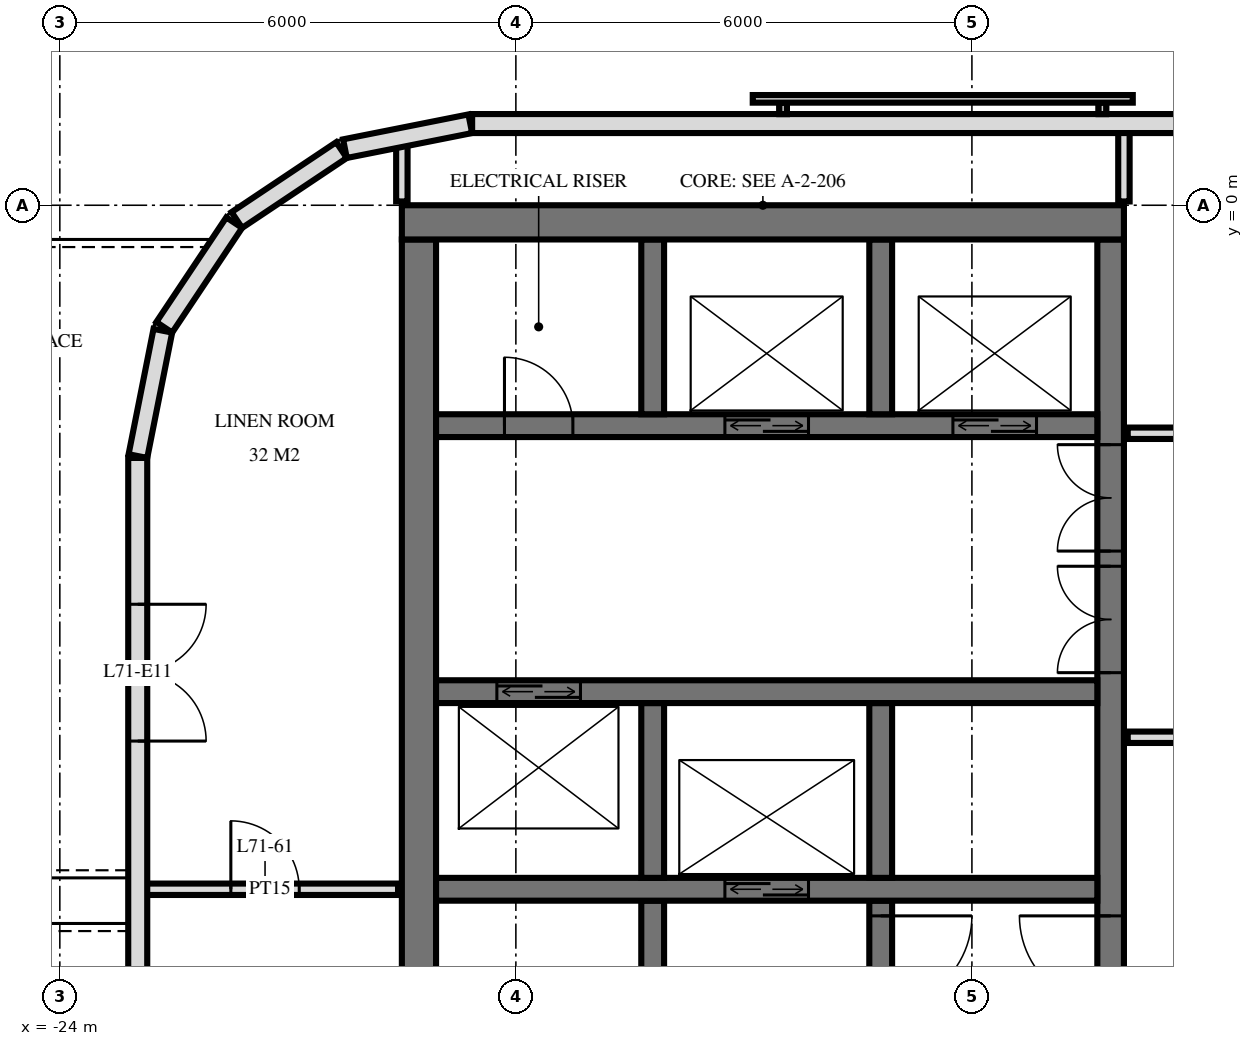
"""IFC4 building model, lengths in metres.
Left out: names, types, materials, properties, quantities, classifications, styles, units other than length and angle.
Written with IfcOpenShell. Run it as: python <this file> out.ifc"""

import sys

from ifc_helpers import new_model, si_unit, direction, frame, frame_2d, origin, place, context, subcontext, project, spatial, rectangle, extrude, element, fill, save


model = new_model("IFC4")
c1 = context("Model", 3, precision=1e-05, world=origin(), true_north=direction((0.0, 1.0)))
c2 = subcontext(c1, "Body", "Model", "MODEL_VIEW")
j1 = project(units=[si_unit("LENGTHUNIT", "METRE"), si_unit("PLANEANGLEUNIT", "RADIAN")], contexts=[c1])
p1 = place(None, origin())
s1 = spatial("IfcSite", under=j1, at=p1, CompositionType="ELEMENT")
p2 = place(p1, origin())
s2 = spatial("IfcBuilding", under=s1, at=p2, CompositionType="ELEMENT")
p3 = place(p2, frame((0.0, 0.0, 270.1)))
s3 = spatial("IfcBuildingStorey", under=s2, at=p3, CompositionType="ELEMENT", Elevation=270.1)
p4 = place(p3, frame((-19.5, -0.225, 0.0), z_axis=(0.0, 0.0, 1.0), x_axis=(1.0, 0.0, 0.0)))
e1 = element("IfcWall", 1, at=p4, inside=s3, PredefinedType="SHEAR", context=c2, shape_type="SweptSolid", body=[
    extrude(rectangle(XDim=9.5, YDim=0.45, at=frame_2d((4.75, 0.0))), origin(), (0.0, 0.0, 1.0), 3.5),
])
p5 = place(p3, frame((-10.175, -14.55, 0.0), z_axis=(0.0, 0.0, 1.0), x_axis=(0.0, 1.0, 0.0)))
e2 = element("IfcWall", 2, at=p5, inside=s3, PredefinedType="SHEAR", context=c2, shape_type="SweptSolid", body=[
    extrude(rectangle(XDim=14.1, YDim=0.35, at=frame_2d((7.05, 0.0))), origin(), (0.0, 0.0, 1.0), 3.5),
])
p6 = place(p5, frame((8.4, 0.0, 0.0)))
e3 = element("IfcOpeningElement", 3, at=p6, cuts=e2, PredefinedType="OPENING", context=c2, shape_type="SweptSolid", body=[
    extrude(rectangle(XDim=1.4, YDim=2.4, at=frame_2d((0.7, 1.2))), frame((0.0, 0.185, 0.0), z_axis=(0.0, -1.0, 0.0), x_axis=(1.0, 0.0, 0.0)), (0.0, 0.0, 1.0), 0.37),
])
p7 = place(p5, frame((10.0, 0.0, 0.0)))
e4 = element("IfcOpeningElement", 4, at=p7, cuts=e2, PredefinedType="OPENING", context=c2, shape_type="SweptSolid", body=[
    extrude(rectangle(XDim=1.4, YDim=2.4, at=frame_2d((0.7, 1.2))), frame((0.0, 0.185, 0.0), z_axis=(0.0, -1.0, 0.0), x_axis=(1.0, 0.0, 0.0)), (0.0, 0.0, 1.0), 0.37),
])
p8 = place(p5, frame((4.0, 0.0, 0.0)))
e5 = element("IfcOpeningElement", 5, at=p8, cuts=e2, PredefinedType="OPENING", context=c2, shape_type="SweptSolid", body=[
    extrude(rectangle(XDim=1.2, YDim=2.1, at=frame_2d((0.6, 1.05))), frame((0.0, 0.185, 0.0), z_axis=(0.0, -1.0, 0.0), x_axis=(1.0, 0.0, 0.0)), (0.0, 0.0, 1.0), 0.37),
])
p9 = place(p3, frame((-19.275, -14.55, 0.0), z_axis=(0.0, 0.0, 1.0), x_axis=(0.0, 1.0, 0.0)))
e6 = element("IfcWall", 6, at=p9, inside=s3, PredefinedType="SHEAR", context=c2, shape_type="SweptSolid", body=[
    extrude(rectangle(XDim=14.1, YDim=0.45, at=frame_2d((7.05, 0.0))), origin(), (0.0, 0.0, 1.0), 3.5),
])
p10 = place(p3, frame((-19.05, -2.9, 0.0), z_axis=(0.0, 0.0, 1.0), x_axis=(1.0, 0.0, 0.0)))
e7 = element("IfcWall", 7, at=p10, inside=s3, PredefinedType="SHEAR", context=c2, shape_type="SweptSolid", body=[
    extrude(rectangle(XDim=8.7, YDim=0.3, at=frame_2d((4.35, 0.0))), origin(), (0.0, 0.0, 1.0), 3.5),
])
p11 = place(p10, frame((6.8, 0.0, 0.0)))
e8 = element("IfcOpeningElement", 8, at=p11, cuts=e7, PredefinedType="OPENING", context=c2, shape_type="SweptSolid", body=[
    extrude(rectangle(XDim=1.1, YDim=2.1, at=frame_2d((0.55, 1.05))), frame((0.0, 0.16, 0.0), z_axis=(0.0, -1.0, 0.0), x_axis=(1.0, 0.0, 0.0)), (0.0, 0.0, 1.0), 0.32),
])
p12 = place(p10, frame((3.8, 0.0, 0.0)))
e9 = element("IfcOpeningElement", 9, at=p12, cuts=e7, PredefinedType="OPENING", context=c2, shape_type="SweptSolid", body=[
    extrude(rectangle(XDim=1.1, YDim=2.1, at=frame_2d((0.55, 1.05))), frame((0.0, 0.16, 0.0), z_axis=(0.0, -1.0, 0.0), x_axis=(1.0, 0.0, 0.0)), (0.0, 0.0, 1.0), 0.32),
])
p13 = place(p10, frame((0.9, 0.0, 0.0)))
e10 = element("IfcOpeningElement", 10, at=p13, cuts=e7, PredefinedType="OPENING", context=c2, shape_type="SweptSolid", body=[
    extrude(rectangle(XDim=0.9, YDim=2.1, at=frame_2d((0.45, 1.05))), frame((0.0, 0.16, 0.0), z_axis=(0.0, -1.0, 0.0), x_axis=(1.0, 0.0, 0.0)), (0.0, 0.0, 1.0), 0.32),
])
p14 = place(p3, frame((-19.05, -6.4, 0.0), z_axis=(0.0, 0.0, 1.0), x_axis=(1.0, 0.0, 0.0)))
e11 = element("IfcWall", 11, at=p14, inside=s3, PredefinedType="SHEAR", context=c2, shape_type="SweptSolid", body=[
    extrude(rectangle(XDim=8.7, YDim=0.3, at=frame_2d((4.35, 0.0))), origin(), (0.0, 0.0, 1.0), 3.5),
])
p15 = place(p14, frame((0.8, 0.0, 0.0)))
e12 = element("IfcOpeningElement", 12, at=p15, cuts=e11, PredefinedType="OPENING", context=c2, shape_type="SweptSolid", body=[
    extrude(rectangle(XDim=1.1, YDim=2.1, at=frame_2d((0.55, 1.05))), frame((0.0, 0.16, 0.0), z_axis=(0.0, -1.0, 0.0), x_axis=(1.0, 0.0, 0.0)), (0.0, 0.0, 1.0), 0.32),
])
p16 = place(p3, frame((-19.05, -9.0, 0.0), z_axis=(0.0, 0.0, 1.0), x_axis=(1.0, 0.0, 0.0)))
e13 = element("IfcWall", 13, at=p16, inside=s3, PredefinedType="SHEAR", context=c2, shape_type="SweptSolid", body=[
    extrude(rectangle(XDim=8.7, YDim=0.3, at=frame_2d((4.35, 0.0))), origin(), (0.0, 0.0, 1.0), 3.5),
])
p17 = place(p16, frame((3.8, 0.0, 0.0)))
e14 = element("IfcOpeningElement", 14, at=p17, cuts=e13, PredefinedType="OPENING", context=c2, shape_type="SweptSolid", body=[
    extrude(rectangle(XDim=1.1, YDim=2.1, at=frame_2d((0.55, 1.05))), frame((0.0, 0.16, 0.0), z_axis=(0.0, -1.0, 0.0), x_axis=(1.0, 0.0, 0.0)), (0.0, 0.0, 1.0), 0.32),
])
for number, where, z_axis, x_axis in (
    (15, (-13.2, -2.75, 0.0), (0.0, 0.0, 1.0), (0.0, 1.0, 0.0)),
    (16, (-13.2, -8.85, 0.0), (0.0, 0.0, 1.0), (0.0, 1.0, 0.0)),
):
    element("IfcWall", number, at=place(p3, frame(where, z_axis=z_axis, x_axis=x_axis)), inside=s3, PredefinedType="SHEAR", context=c2, shape_type="SweptSolid", body=[
        extrude(rectangle(XDim=2.3, YDim=0.3, at=frame_2d((1.15, 0.0))), origin(), (0.0, 0.0, 1.0), 3.5),
    ])
p18 = place(p3, frame((-13.2, -14.55, 0.0), z_axis=(0.0, 0.0, 1.0), x_axis=(0.0, 1.0, 0.0)))
e17 = element("IfcWall", 17, at=p18, inside=s3, PredefinedType="SHEAR", context=c2, shape_type="SweptSolid", body=[
    extrude(rectangle(XDim=5.4, YDim=0.3, at=frame_2d((2.7, 0.0))), origin(), (0.0, 0.0, 1.0), 3.5),
])
p19 = place(p18, frame((4.0, 0.0, 0.0)))
e18 = element("IfcOpeningElement", 18, at=p19, cuts=e17, PredefinedType="OPENING", context=c2, shape_type="SweptSolid", body=[
    extrude(rectangle(XDim=1.2, YDim=2.1, at=frame_2d((0.6, 1.05))), frame((0.0, 0.16, 0.0), z_axis=(0.0, -1.0, 0.0), x_axis=(1.0, 0.0, 0.0)), (0.0, 0.0, 1.0), 0.32),
])
for number, where, z_axis, x_axis in (
    (19, (-16.2, -2.75, 0.0), (0.0, 0.0, 1.0), (0.0, 1.0, 0.0)),
    (20, (-16.2, -8.85, 0.0), (0.0, 0.0, 1.0), (0.0, 1.0, 0.0)),
):
    element("IfcWall", number, at=place(p3, frame(where, z_axis=z_axis, x_axis=x_axis)), inside=s3, PredefinedType="SHEAR", context=c2, shape_type="SweptSolid", body=[
        extrude(rectangle(XDim=2.3, YDim=0.3, at=frame_2d((1.15, 0.0))), origin(), (0.0, 0.0, 1.0), 3.5),
    ])
p20 = place(p3, frame((-16.2, -14.55, 0.0), z_axis=(0.0, 0.0, 1.0), x_axis=(0.0, 1.0, 0.0)))
e21 = element("IfcWall", 21, at=p20, inside=s3, PredefinedType="SHEAR", context=c2, shape_type="SweptSolid", body=[
    extrude(rectangle(XDim=5.4, YDim=0.3, at=frame_2d((2.7, 0.0))), origin(), (0.0, 0.0, 1.0), 3.5),
])
p21 = place(p20, frame((0.2, 0.0, 0.0)))
e22 = element("IfcOpeningElement", 22, at=p21, cuts=e21, PredefinedType="OPENING", context=c2, shape_type="SweptSolid", body=[
    extrude(rectangle(XDim=1.2, YDim=2.1, at=frame_2d((0.6, 1.05))), frame((0.0, 0.16, 0.0), z_axis=(0.0, -1.0, 0.0), x_axis=(1.0, 0.0, 0.0)), (0.0, 0.0, 1.0), 0.32),
])
p22 = place(p3, frame((18.575, 1.075, 0.0), z_axis=(0.0, 0.0, 1.0), x_axis=(-1.0, 0.0, 0.0)))
e23 = element("IfcWall", 23, at=p22, inside=s3, PredefinedType="SOLIDWALL", context=c2, shape_type="SweptSolid", body=[
    extrude(rectangle(XDim=37.151, YDim=0.25, at=frame_2d((18.575, 0.0))), origin(), (0.0, 0.0, 1.0), 3.22),
])
p23 = place(p22, frame((9.275, 0.0, 0.9)))
e24 = element("IfcOpeningElement", 24, at=p23, cuts=e23, PredefinedType="OPENING", context=c2, shape_type="SweptSolid", body=[
    extrude(rectangle(XDim=2.4, YDim=1.5, at=frame_2d((1.2, 0.75))), frame((0.0, 0.135, 0.0), z_axis=(0.0, -1.0, 0.0), x_axis=(1.0, 0.0, 0.0)), (0.0, 0.0, 1.0), 0.27),
])
p24 = place(p22, frame((15.275, 0.0, 0.9)))
e25 = element("IfcOpeningElement", 25, at=p24, cuts=e23, PredefinedType="OPENING", context=c2, shape_type="SweptSolid", body=[
    extrude(rectangle(XDim=2.4, YDim=1.5, at=frame_2d((1.2, 0.75))), frame((0.0, 0.135, 0.0), z_axis=(0.0, -1.0, 0.0), x_axis=(1.0, 0.0, 0.0)), (0.0, 0.0, 1.0), 0.27),
])
p25 = place(p22, frame((25.125, 0.0, 0.9)))
e26 = element("IfcOpeningElement", 26, at=p25, cuts=e23, PredefinedType="OPENING", context=c2, shape_type="SweptSolid", body=[
    extrude(rectangle(XDim=2.4, YDim=1.5, at=frame_2d((1.2, 0.75))), frame((0.0, 0.135, 0.0), z_axis=(0.0, -1.0, 0.0), x_axis=(1.0, 0.0, 0.0)), (0.0, 0.0, 1.0), 0.27),
])
p26 = place(p3, frame((-18.6, 1.073, 0.0), z_axis=(0.0, 0.0, 1.0), x_axis=(-0.980797896849, -0.195026884138, 0.0)))
e27 = element("IfcWall", 27, at=p26, inside=s3, PredefinedType="SOLIDWALL", context=c2, shape_type="SweptSolid", body=[
    extrude(rectangle(XDim=1.681, YDim=0.25, at=frame_2d((0.841, 0.0))), origin(), (0.0, 0.0, 1.0), 3.22),
])
for number, where, z_axis, x_axis in (
    (28, (-20.294, 0.726, 0.0), (0.0, 0.0, 1.0), (-0.831, -0.556, 0.0)),
    (29, (-21.706, -0.229, 0.0), (0.0, 0.0, 1.0), (-0.556, -0.831, 0.0)),
):
    element("IfcWall", number, at=place(p3, frame(where, z_axis=z_axis, x_axis=x_axis)), inside=s3, PredefinedType="SOLIDWALL", context=c2, shape_type="SweptSolid", body=[
        extrude(rectangle(XDim=1.656, YDim=0.25, at=frame_2d((0.828, 0.0))), origin(), (0.0, 0.0, 1.0), 3.22),
    ])
p27 = place(p3, frame((-22.645, -1.651, 0.0), z_axis=(0.0, 0.0, 1.0), x_axis=(-0.19513878023, -0.980775640221, 0.0)))
e30 = element("IfcWall", 30, at=p27, inside=s3, PredefinedType="SOLIDWALL", context=c2, shape_type="SweptSolid", body=[
    extrude(rectangle(XDim=1.681, YDim=0.25, at=frame_2d((0.841, 0.0))), origin(), (0.0, 0.0, 1.0), 3.22),
])
p28 = place(p3, frame((-22.975, -3.325, 0.0), z_axis=(0.0, 0.0, 1.0), x_axis=(0.0, -1.0, 0.0)))
e31 = element("IfcWall", 31, at=p28, inside=s3, PredefinedType="SOLIDWALL", context=c2, shape_type="SweptSolid", body=[
    extrude(rectangle(XDim=25.951, YDim=0.25, at=frame_2d((12.975, 0.0))), origin(), (0.0, 0.0, 1.0), 3.22),
])
p29 = place(p28, frame((1.925, 0.0, 0.0)))
e32 = element("IfcOpeningElement", 32, at=p29, cuts=e31, PredefinedType="OPENING", context=c2, shape_type="SweptSolid", body=[
    extrude(rectangle(XDim=1.8, YDim=2.4, at=frame_2d((0.9, 1.2))), frame((0.0, 0.135, 0.0), z_axis=(0.0, -1.0, 0.0), x_axis=(1.0, 0.0, 0.0)), (0.0, 0.0, 1.0), 0.27),
])
p30 = place(p28, frame((7.975, 0.0, 0.0)))
e33 = element("IfcOpeningElement", 33, at=p30, cuts=e31, PredefinedType="OPENING", context=c2, shape_type="SweptSolid", body=[
    extrude(rectangle(XDim=1.8, YDim=2.4, at=frame_2d((0.9, 1.2))), frame((0.0, 0.135, 0.0), z_axis=(0.0, -1.0, 0.0), x_axis=(1.0, 0.0, 0.0)), (0.0, 0.0, 1.0), 0.27),
])
p31 = place(p28, frame((12.575, 0.0, 0.9)))
e34 = element("IfcOpeningElement", 34, at=p31, cuts=e31, PredefinedType="OPENING", context=c2, shape_type="SweptSolid", body=[
    extrude(rectangle(XDim=1.2, YDim=1.5, at=frame_2d((0.6, 0.75))), frame((0.0, 0.135, 0.0), z_axis=(0.0, -1.0, 0.0), x_axis=(1.0, 0.0, 0.0)), (0.0, 0.0, 1.0), 0.27),
])
p32 = place(p28, frame((15.775, 0.0, 0.0)))
e35 = element("IfcOpeningElement", 35, at=p32, cuts=e31, PredefinedType="OPENING", context=c2, shape_type="SweptSolid", body=[
    extrude(rectangle(XDim=1.8, YDim=2.4, at=frame_2d((0.9, 1.2))), frame((0.0, 0.135, 0.0), z_axis=(0.0, -1.0, 0.0), x_axis=(1.0, 0.0, 0.0)), (0.0, 0.0, 1.0), 0.27),
])
p33 = place(p28, frame((21.075, 0.0, 0.0)))
e36 = element("IfcOpeningElement", 36, at=p33, cuts=e31, PredefinedType="OPENING", context=c2, shape_type="SweptSolid", body=[
    extrude(rectangle(XDim=1.8, YDim=2.4, at=frame_2d((0.9, 1.2))), frame((0.0, 0.135, 0.0), z_axis=(0.0, -1.0, 0.0), x_axis=(1.0, 0.0, 0.0)), (0.0, 0.0, 1.0), 0.27),
])
p34 = place(p28, frame((23.825, 0.0, 0.9)))
e37 = element("IfcOpeningElement", 37, at=p34, cuts=e31, PredefinedType="OPENING", context=c2, shape_type="SweptSolid", body=[
    extrude(rectangle(XDim=1.8, YDim=1.5, at=frame_2d((0.9, 0.75))), frame((0.0, 0.135, 0.0), z_axis=(0.0, -1.0, 0.0), x_axis=(1.0, 0.0, 0.0)), (0.0, 0.0, 1.0), 0.27),
])
p35 = place(p3, frame((-10.0, 0.05, 0.0), z_axis=(0.0, 0.0, 1.0), x_axis=(0.0, 1.0, 0.0)))
e38 = element("IfcWall", 38, at=p35, inside=s3, PredefinedType="PARTITIONING", context=c2, shape_type="SweptSolid", body=[
    extrude(rectangle(XDim=0.97, YDim=0.15, at=frame_2d((0.485, 0.0))), origin(), (0.0, 0.0, 1.0), 3.22),
])
p36 = place(p3, frame((-19.5, 0.05, 0.0), z_axis=(0.0, 0.0, 1.0), x_axis=(0.0, 1.0, 0.0)))
e39 = element("IfcWall", 39, at=p36, inside=s3, PredefinedType="PARTITIONING", context=c2, shape_type="SweptSolid", body=[
    extrude(rectangle(XDim=0.787, YDim=0.15, at=frame_2d((0.394, 0.0))), origin(), (0.0, 0.0, 1.0), 3.22),
])
p37 = place(p3, frame((-22.92, -9.0, 0.0), z_axis=(0.0, 0.0, 1.0), x_axis=(1.0, 0.0, 0.0)))
e40 = element("IfcWall", 40, at=p37, inside=s3, PredefinedType="PARTITIONING", context=c2, shape_type="SweptSolid", body=[
    extrude(rectangle(XDim=3.37, YDim=0.15, at=frame_2d((1.685, 0.0))), origin(), (0.0, 0.0, 1.0), 3.22),
])
p38 = place(p37, frame((1.17, 0.0, 0.0)))
e41 = element("IfcOpeningElement", 41, at=p38, cuts=e40, PredefinedType="OPENING", context=c2, shape_type="SweptSolid", body=[
    extrude(rectangle(XDim=0.9, YDim=2.1, at=frame_2d((0.45, 1.05))), frame((0.0, 0.085, 0.0), z_axis=(0.0, -1.0, 0.0), x_axis=(1.0, 0.0, 0.0)), (0.0, 0.0, 1.0), 0.17),
])
p39 = place(p3, frame((-9.95, -7.0, 0.0), z_axis=(0.0, 0.0, 1.0), x_axis=(1.0, 0.0, 0.0)))
e42 = element("IfcWall", 42, at=p39, inside=s3, PredefinedType="PARTITIONING", context=c2, shape_type="SweptSolid", body=[
    extrude(rectangle(XDim=19.9, YDim=0.15, at=frame_2d((9.95, 0.0))), origin(), (0.0, 0.0, 1.0), 3.22),
])
p40 = place(p39, frame((9.45, 0.0, 0.0)))
e43 = element("IfcOpeningElement", 43, at=p40, cuts=e42, PredefinedType="OPENING", context=c2, shape_type="SweptSolid", body=[
    extrude(rectangle(XDim=1.0, YDim=2.1, at=frame_2d((0.5, 1.05))), frame((0.0, 0.085, 0.0), z_axis=(0.0, -1.0, 0.0), x_axis=(1.0, 0.0, 0.0)), (0.0, 0.0, 1.0), 0.17),
])
p41 = place(p39, frame((15.45, 0.0, 0.0)))
e44 = element("IfcOpeningElement", 44, at=p41, cuts=e42, PredefinedType="OPENING", context=c2, shape_type="SweptSolid", body=[
    extrude(rectangle(XDim=1.0, YDim=2.1, at=frame_2d((0.5, 1.05))), frame((0.0, 0.085, 0.0), z_axis=(0.0, -1.0, 0.0), x_axis=(1.0, 0.0, 0.0)), (0.0, 0.0, 1.0), 0.17),
])
p42 = place(p3, frame((-9.95, -3.0, 0.0), z_axis=(0.0, 0.0, 1.0), x_axis=(1.0, 0.0, 0.0)))
e45 = element("IfcWall", 45, at=p42, inside=s3, PredefinedType="PARTITIONING", context=c2, shape_type="SweptSolid", body=[
    extrude(rectangle(XDim=19.9, YDim=0.15, at=frame_2d((9.95, 0.0))), origin(), (0.0, 0.0, 1.0), 3.22),
])
p43 = place(p42, frame((1.7, 0.0, 0.0)))
e46 = element("IfcOpeningElement", 46, at=p43, cuts=e45, PredefinedType="OPENING", context=c2, shape_type="SweptSolid", body=[
    extrude(rectangle(XDim=1.0, YDim=2.1, at=frame_2d((0.5, 1.05))), frame((0.0, 0.085, 0.0), z_axis=(0.0, -1.0, 0.0), x_axis=(1.0, 0.0, 0.0)), (0.0, 0.0, 1.0), 0.17),
])
p44 = place(p42, frame((5.45, 0.0, 0.0)))
e47 = element("IfcOpeningElement", 47, at=p44, cuts=e45, PredefinedType="OPENING", context=c2, shape_type="SweptSolid", body=[
    extrude(rectangle(XDim=1.0, YDim=2.1, at=frame_2d((0.5, 1.05))), frame((0.0, 0.085, 0.0), z_axis=(0.0, -1.0, 0.0), x_axis=(1.0, 0.0, 0.0)), (0.0, 0.0, 1.0), 0.17),
])
p45 = place(p42, frame((8.2, 0.0, 0.0)))
e48 = element("IfcOpeningElement", 48, at=p45, cuts=e45, PredefinedType="OPENING", context=c2, shape_type="SweptSolid", body=[
    extrude(rectangle(XDim=1.0, YDim=2.1, at=frame_2d((0.5, 1.05))), frame((0.0, 0.085, 0.0), z_axis=(0.0, -1.0, 0.0), x_axis=(1.0, 0.0, 0.0)), (0.0, 0.0, 1.0), 0.17),
])
p46 = place(p42, frame((11.95, 0.0, 0.0)))
e49 = element("IfcOpeningElement", 49, at=p46, cuts=e45, PredefinedType="OPENING", context=c2, shape_type="SweptSolid", body=[
    extrude(rectangle(XDim=1.0, YDim=2.1, at=frame_2d((0.5, 1.05))), frame((0.0, 0.085, 0.0), z_axis=(0.0, -1.0, 0.0), x_axis=(1.0, 0.0, 0.0)), (0.0, 0.0, 1.0), 0.17),
])
p47 = place(p42, frame((16.95, 0.0, 0.0)))
e50 = element("IfcOpeningElement", 50, at=p47, cuts=e45, PredefinedType="OPENING", context=c2, shape_type="SweptSolid", body=[
    extrude(rectangle(XDim=1.0, YDim=2.1, at=frame_2d((0.5, 1.05))), frame((0.0, 0.085, 0.0), z_axis=(0.0, -1.0, 0.0), x_axis=(1.0, 0.0, 0.0)), (0.0, 0.0, 1.0), 0.17),
])
p48 = place(p29, origin())
e51 = element("IfcDoor", 51, at=p48, inside=s3, OperationType="DOUBLE_DOOR_SINGLE_SWING", PredefinedType="DOOR", context=c2, shape_type="SweptSolid", body=[
    extrude(rectangle(XDim=1.8, YDim=2.4, at=frame_2d((0.9, 1.2))), frame((0.0, 0.025, 0.0), z_axis=(0.0, -1.0, 0.0), x_axis=(1.0, 0.0, 0.0)), (0.0, 0.0, 1.0), 0.05),
])
fill(e32, e51)
p49 = place(p11, origin())
e52 = element("IfcDoor", 52, at=p49, inside=s3, OperationType="DOUBLE_DOOR_SLIDING", PredefinedType="USERDEFINED", context=c2, shape_type="SweptSolid", body=[
    extrude(rectangle(XDim=1.1, YDim=2.1, at=frame_2d((0.55, 1.05))), frame((0.0, 0.025, 0.0), z_axis=(0.0, -1.0, 0.0), x_axis=(1.0, 0.0, 0.0)), (0.0, 0.0, 1.0), 0.05),
])
fill(e8, e52)
p50 = place(p12, origin())
e53 = element("IfcDoor", 53, at=p50, inside=s3, OperationType="DOUBLE_DOOR_SLIDING", PredefinedType="USERDEFINED", context=c2, shape_type="SweptSolid", body=[
    extrude(rectangle(XDim=1.1, YDim=2.1, at=frame_2d((0.55, 1.05))), frame((0.0, 0.025, 0.0), z_axis=(0.0, -1.0, 0.0), x_axis=(1.0, 0.0, 0.0)), (0.0, 0.0, 1.0), 0.05),
])
fill(e9, e53)
p51 = place(p17, origin())
e54 = element("IfcDoor", 54, at=p51, inside=s3, OperationType="DOUBLE_DOOR_SLIDING", PredefinedType="USERDEFINED", context=c2, shape_type="SweptSolid", body=[
    extrude(rectangle(XDim=1.1, YDim=2.1, at=frame_2d((0.55, 1.05))), frame((0.0, 0.025, 0.0), z_axis=(0.0, -1.0, 0.0), x_axis=(1.0, 0.0, 0.0)), (0.0, 0.0, 1.0), 0.05),
])
fill(e14, e54)
p52 = place(p15, origin())
e55 = element("IfcDoor", 55, at=p52, inside=s3, OperationType="DOUBLE_DOOR_SLIDING", PredefinedType="USERDEFINED", context=c2, shape_type="SweptSolid", body=[
    extrude(rectangle(XDim=1.1, YDim=2.1, at=frame_2d((0.55, 1.05))), frame((0.0, 0.025, 0.0), z_axis=(0.0, -1.0, 0.0), x_axis=(1.0, 0.0, 0.0)), (0.0, 0.0, 1.0), 0.05),
])
fill(e12, e55)
p53 = place(p6, origin())
e56 = element("IfcDoor", 56, at=p53, inside=s3, OperationType="DOUBLE_DOOR_SINGLE_SWING", PredefinedType="DOOR", context=c2, shape_type="SweptSolid", body=[
    extrude(rectangle(XDim=1.4, YDim=2.4, at=frame_2d((0.7, 1.2))), frame((0.0, 0.025, 0.0), z_axis=(0.0, -1.0, 0.0), x_axis=(1.0, 0.0, 0.0)), (0.0, 0.0, 1.0), 0.05),
])
fill(e3, e56)
p54 = place(p7, origin())
e57 = element("IfcDoor", 57, at=p54, inside=s3, OperationType="DOUBLE_DOOR_SINGLE_SWING", PredefinedType="DOOR", context=c2, shape_type="SweptSolid", body=[
    extrude(rectangle(XDim=1.4, YDim=2.4, at=frame_2d((0.7, 1.2))), frame((0.0, 0.025, 0.0), z_axis=(0.0, -1.0, 0.0), x_axis=(1.0, 0.0, 0.0)), (0.0, 0.0, 1.0), 0.05),
])
fill(e4, e57)
p55 = place(p8, origin())
e58 = element("IfcDoor", 58, at=p55, inside=s3, OperationType="SINGLE_SWING_LEFT", PredefinedType="DOOR", context=c2, shape_type="SweptSolid", body=[
    extrude(rectangle(XDim=1.2, YDim=2.1, at=frame_2d((0.6, 1.05))), frame((0.0, 0.025, 0.0), z_axis=(0.0, -1.0, 0.0), x_axis=(1.0, 0.0, 0.0)), (0.0, 0.0, 1.0), 0.05),
])
fill(e5, e58)
p56 = place(p13, origin())
e59 = element("IfcDoor", 59, at=p56, inside=s3, OperationType="SINGLE_SWING_RIGHT", PredefinedType="DOOR", context=c2, shape_type="SweptSolid", body=[
    extrude(rectangle(XDim=0.9, YDim=2.1, at=frame_2d((0.45, 1.05))), frame((0.0, 0.025, 0.0), z_axis=(0.0, -1.0, 0.0), x_axis=(1.0, 0.0, 0.0)), (0.0, 0.0, 1.0), 0.05),
])
fill(e10, e59)
p57 = place(p19, frame((0.6, 0.0, 0.0), z_axis=(0.0, 0.0, 1.0), x_axis=(-1.0, 0.0, 0.0)))
e60 = element("IfcDoor", 60, at=p57, inside=s3, OperationType="SINGLE_SWING_RIGHT", PredefinedType="DOOR", context=c2, shape_type="SweptSolid", body=[
    extrude(rectangle(XDim=1.2, YDim=2.1, at=frame_2d((0.0, 1.05))), frame((0.0, -0.025, 0.0), z_axis=(0.0, 1.0, 0.0), x_axis=(-1.0, 0.0, 0.0)), (0.0, 0.0, 1.0), 0.05),
])
fill(e18, e60)
p58 = place(p38, origin())
e61 = element("IfcDoor", 61, at=p58, inside=s3, OperationType="SINGLE_SWING_RIGHT", PredefinedType="DOOR", context=c2, shape_type="SweptSolid", body=[
    extrude(rectangle(XDim=0.9, YDim=2.1, at=frame_2d((0.45, 1.05))), frame((0.0, 0.025, 0.0), z_axis=(0.0, -1.0, 0.0), x_axis=(1.0, 0.0, 0.0)), (0.0, 0.0, 1.0), 0.05),
])
fill(e41, e61)
save(model, sys.argv[1])
